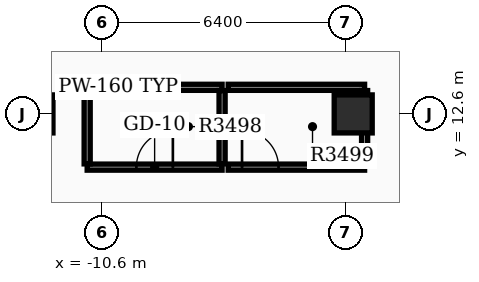
"""IFC4 building model, lengths in metres.
Left out: names, types, materials, properties, quantities, classifications, styles, units other than length and angle.
Written with IfcOpenShell. Run it as: python <this file> out.ifc"""

import sys

from ifc_helpers import new_model, si_unit, direction, frame, frame_2d, origin, origin_2d, place, context, subcontext, project, spatial, rectangle, extrude, element, fill, save


model = new_model("IFC4")
c1 = context("Model", 3, precision=1e-05, world=origin(), true_north=direction((0.0, 1.0)))
c2 = subcontext(c1, "Body", "Model", "MODEL_VIEW")
j1 = project(units=[si_unit("LENGTHUNIT", "METRE"), si_unit("PLANEANGLEUNIT", "RADIAN")], contexts=[c1])
p1 = place(None, origin())
s1 = spatial("IfcSite", under=j1, at=p1, CompositionType="ELEMENT")
p2 = place(p1, origin())
s2 = spatial("IfcBuilding", under=s1, at=p2, CompositionType="ELEMENT")
p3 = place(p2, frame((0.0, 0.0, 220.8)))
s3 = spatial("IfcBuildingStorey", under=s2, at=p3, CompositionType="ELEMENT", Elevation=220.8)
for number, where, z_axis, x_axis in (
    (1, (-12.4, 12.6, 0.0), (0.0, 0.0, 1.0), (1.0, 0.0, 0.0)),
    (2, (-4.0, 12.6, 0.0), (0.0, 0.0, 1.0), (1.0, 0.0, 0.0)),
):
    element("IfcColumn", number, at=place(p3, frame(where, z_axis=z_axis, x_axis=x_axis)), inside=s3, PredefinedType="COLUMN", context=c2, shape_type="SweptSolid", body=[
        extrude(rectangle(XDim=1.0, YDim=1.0, at=origin_2d()), origin(), (0.0, 0.0, 1.0), 3.9),
    ])
p4 = place(p3, frame((-11.0, 11.2, 0.0), z_axis=(0.0, 0.0, 1.0), x_axis=(1.0, 0.0, 0.0)))
e3 = element("IfcWall", 3, at=p4, inside=s3, PredefinedType="PARTITIONING", context=c2, shape_type="SweptSolid", body=[
    extrude(rectangle(XDim=3.55, YDim=0.16, at=frame_2d((1.775, 0.0))), origin(), (0.0, 0.0, 1.0), 3.17),
])
p5 = place(p4, frame((1.295, 0.0, 0.0)))
e4 = element("IfcOpeningElement", 4, at=p5, cuts=e3, PredefinedType="OPENING", context=c2, shape_type="SweptSolid", body=[
    extrude(rectangle(XDim=0.96, YDim=2.15, at=frame_2d((0.48, 1.075))), frame((0.0, 0.09, 0.0), z_axis=(0.0, -1.0, 0.0), x_axis=(1.0, 0.0, 0.0)), (0.0, 0.0, 1.0), 0.18),
])
p6 = place(p3, frame((-11.0, 13.3, 0.0), z_axis=(0.0, 0.0, 1.0), x_axis=(1.0, 0.0, 0.0)))
e5 = element("IfcWall", 5, at=p6, inside=s3, PredefinedType="PARTITIONING", context=c2, shape_type="SweptSolid", body=[
    extrude(rectangle(XDim=3.55, YDim=0.16, at=frame_2d((1.775, 0.0))), origin(), (0.0, 0.0, 1.0), 3.17),
])
for number, where, z_axis, x_axis in (
    (6, (-11.0, 11.285, 0.0), (0.0, 0.0, 1.0), (0.0, 1.0, 0.0)),
    (7, (-7.45, 11.285, 0.0), (0.0, 0.0, 1.0), (0.0, 1.0, 0.0)),
):
    element("IfcWall", number, at=place(p3, frame(where, z_axis=z_axis, x_axis=x_axis)), inside=s3, PredefinedType="PARTITIONING", context=c2, shape_type="SweptSolid", body=[
        extrude(rectangle(XDim=1.93, YDim=0.16, at=frame_2d((0.965, 0.0))), origin(), (0.0, 0.0, 1.0), 3.17),
    ])
p7 = place(p3, frame((-7.29, 11.2, 0.0), z_axis=(0.0, 0.0, 1.0), x_axis=(1.0, 0.0, 0.0)))
e8 = element("IfcWall", 8, at=p7, inside=s3, PredefinedType="PARTITIONING", context=c2, shape_type="SweptSolid", body=[
    extrude(rectangle(XDim=3.59, YDim=0.16, at=frame_2d((1.795, 0.0))), origin(), (0.0, 0.0, 1.0), 3.17),
])
p8 = place(p7, frame((0.365, 0.0, 0.0)))
e9 = element("IfcOpeningElement", 9, at=p8, cuts=e8, PredefinedType="OPENING", context=c2, shape_type="SweptSolid", body=[
    extrude(rectangle(XDim=0.96, YDim=2.15, at=frame_2d((0.48, 1.075))), frame((0.0, 0.09, 0.0), z_axis=(0.0, -1.0, 0.0), x_axis=(1.0, 0.0, 0.0)), (0.0, 0.0, 1.0), 0.18),
])
p9 = place(p3, frame((-7.29, 13.3, 0.0), z_axis=(0.0, 0.0, 1.0), x_axis=(1.0, 0.0, 0.0)))
e10 = element("IfcWall", 10, at=p9, inside=s3, PredefinedType="PARTITIONING", context=c2, shape_type="SweptSolid", body=[
    extrude(rectangle(XDim=3.59, YDim=0.16, at=frame_2d((1.795, 0.0))), origin(), (0.0, 0.0, 1.0), 3.17),
])
p10 = place(p3, frame((-3.7, 11.285, 0.0), z_axis=(0.0, 0.0, 1.0), x_axis=(0.0, 1.0, 0.0)))
e11 = element("IfcWall", 11, at=p10, inside=s3, PredefinedType="PARTITIONING", context=c2, shape_type="SweptSolid", body=[
    extrude(rectangle(XDim=1.93, YDim=0.16, at=frame_2d((0.965, 0.0))), origin(), (0.0, 0.0, 1.0), 3.17),
])
p11 = place(p5, origin())
e12 = element("IfcDoor", 12, at=p11, inside=s3, OperationType="SINGLE_SWING_RIGHT", PredefinedType="DOOR", context=c2, shape_type="SweptSolid", body=[
    extrude(rectangle(XDim=0.96, YDim=2.15, at=frame_2d((0.48, 1.075))), frame((0.0, 0.025, 0.0), z_axis=(0.0, -1.0, 0.0), x_axis=(1.0, 0.0, 0.0)), (0.0, 0.0, 1.0), 0.05),
])
fill(e4, e12)
p12 = place(p8, origin())
e13 = element("IfcDoor", 13, at=p12, inside=s3, OperationType="SINGLE_SWING_LEFT", PredefinedType="DOOR", context=c2, shape_type="SweptSolid", body=[
    extrude(rectangle(XDim=0.96, YDim=2.15, at=frame_2d((0.48, 1.075))), frame((0.0, 0.025, 0.0), z_axis=(0.0, -1.0, 0.0), x_axis=(1.0, 0.0, 0.0)), (0.0, 0.0, 1.0), 0.05),
])
fill(e9, e13)
save(model, sys.argv[1])
